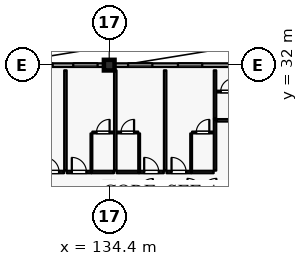
"""IFC4 building model, lengths in metres.
Left out: names, types, materials, properties, quantities, classifications, styles, units other than length and angle.
Written with IfcOpenShell. Run it as: python <this file> out.ifc"""

import sys

from ifc_helpers import new_model, si_unit, direction, frame, frame_2d, origin, origin_2d, place, context, subcontext, project, spatial, rectangle, extrude, element, fill, save


model = new_model("IFC4")
c1 = context("Model", 3, precision=1e-05, world=origin(), true_north=direction((0.0, 1.0)))
c2 = subcontext(c1, "Body", "Model", "MODEL_VIEW")
j1 = project(units=[si_unit("LENGTHUNIT", "METRE"), si_unit("PLANEANGLEUNIT", "RADIAN")], contexts=[c1])
p1 = place(None, origin())
s1 = spatial("IfcSite", under=j1, at=p1, CompositionType="ELEMENT")
p2 = place(p1, origin())
s2 = spatial("IfcBuilding", under=s1, at=p2, CompositionType="ELEMENT")
p3 = place(p2, frame((0.0, 0.0, 36.0)))
s3 = spatial("IfcBuildingStorey", under=s2, at=p3, CompositionType="ELEMENT", Elevation=36.0)
p4 = place(p3, frame((134.4, 32.0, 0.0), z_axis=(0.0, 0.0, 1.0), x_axis=(1.0, 0.0, 0.0)))
e1 = element("IfcColumn", 1, at=p4, inside=s3, PredefinedType="COLUMN", context=c2, shape_type="SweptSolid", body=[
    extrude(rectangle(XDim=0.7, YDim=0.7, at=origin_2d()), origin(), (0.0, 0.0, 1.0), 3.6),
])
p5 = place(p3, frame((134.4, 24.0, 0.0), z_axis=(0.0, 0.0, 1.0), x_axis=(1.0, 0.0, 0.0)))
e2 = element("IfcColumn", 2, at=p5, inside=s3, PredefinedType="COLUMN", context=c2, shape_type="SweptSolid", body=[
    extrude(rectangle(XDim=0.6, YDim=0.6, at=origin_2d()), origin(), (0.0, 0.0, 1.0), 3.6),
])
p6 = place(p3, frame((126.35, 32.0, 0.0), z_axis=(0.0, 0.0, 1.0), x_axis=(1.0, 0.0, 0.0)))
e3 = element("IfcWall", 3, at=p6, inside=s3, PredefinedType="SOLIDWALL", context=c2, shape_type="SweptSolid", body=[
    extrude(rectangle(XDim=7.7, YDim=0.24, at=frame_2d((3.85, 0.0))), origin(), (0.0, 0.0, 1.0), 2.94),
])
p7 = place(p6, frame((0.195, 0.0, 0.8)))
e4 = element("IfcOpeningElement", 4, at=p7, cuts=e3, PredefinedType="OPENING", context=c2, shape_type="SweptSolid", body=[
    extrude(rectangle(XDim=1.4, YDim=1.6, at=frame_2d((0.7, 0.8))), frame((0.0, 0.13, 0.0), z_axis=(0.0, -1.0, 0.0), x_axis=(1.0, 0.0, 0.0)), (0.0, 0.0, 1.0), 0.26),
])
p8 = place(p6, frame((2.73, 0.0, 0.8)))
e5 = element("IfcOpeningElement", 5, at=p8, cuts=e3, PredefinedType="OPENING", context=c2, shape_type="SweptSolid", body=[
    extrude(rectangle(XDim=1.6, YDim=1.6, at=frame_2d((0.8, 0.8))), frame((0.0, 0.13, 0.0), z_axis=(0.0, -1.0, 0.0), x_axis=(1.0, 0.0, 0.0)), (0.0, 0.0, 1.0), 0.26),
])
p9 = place(p6, frame((5.685, 0.0, 0.8)))
e6 = element("IfcOpeningElement", 6, at=p9, cuts=e3, PredefinedType="OPENING", context=c2, shape_type="SweptSolid", body=[
    extrude(rectangle(XDim=1.6, YDim=1.6, at=frame_2d((0.8, 0.8))), frame((0.0, 0.13, 0.0), z_axis=(0.0, -1.0, 0.0), x_axis=(1.0, 0.0, 0.0)), (0.0, 0.0, 1.0), 0.26),
])
p10 = place(p3, frame((134.75, 32.0, 0.0), z_axis=(0.0, 0.0, 1.0), x_axis=(1.0, 0.0, 0.0)))
e7 = element("IfcWall", 7, at=p10, inside=s3, PredefinedType="SOLIDWALL", context=c2, shape_type="SweptSolid", body=[
    extrude(rectangle(XDim=7.7, YDim=0.24, at=frame_2d((3.85, 0.0))), origin(), (0.0, 0.0, 1.0), 2.94),
])
p11 = place(p10, frame((0.89, 0.0, 0.8)))
e8 = element("IfcOpeningElement", 8, at=p11, cuts=e7, PredefinedType="OPENING", context=c2, shape_type="SweptSolid", body=[
    extrude(rectangle(XDim=1.6, YDim=1.6, at=frame_2d((0.8, 0.8))), frame((0.0, 0.13, 0.0), z_axis=(0.0, -1.0, 0.0), x_axis=(1.0, 0.0, 0.0)), (0.0, 0.0, 1.0), 0.26),
])
p12 = place(p10, frame((4.17, 0.0, 0.8)))
e9 = element("IfcOpeningElement", 9, at=p12, cuts=e7, PredefinedType="OPENING", context=c2, shape_type="SweptSolid", body=[
    extrude(rectangle(XDim=1.6, YDim=1.6, at=frame_2d((0.8, 0.8))), frame((0.0, 0.13, 0.0), z_axis=(0.0, -1.0, 0.0), x_axis=(1.0, 0.0, 0.0)), (0.0, 0.0, 1.0), 0.26),
])
p13 = place(p3, frame((129.81, 24.97, 0.0), z_axis=(0.0, 0.0, 1.0), x_axis=(1.0, 0.0, 0.0)))
e10 = element("IfcWall", 10, at=p13, inside=s3, PredefinedType="PARTITIONING", context=c2, shape_type="SweptSolid", body=[
    extrude(rectangle(XDim=1.62, YDim=0.16, at=frame_2d((0.81, 0.0))), origin(), (0.0, 0.0, 1.0), 3.365),
])
p14 = place(p13, frame((0.33, 0.0, 0.0)))
e11 = element("IfcOpeningElement", 11, at=p14, cuts=e10, PredefinedType="OPENING", context=c2, shape_type="SweptSolid", body=[
    extrude(rectangle(XDim=0.96, YDim=2.2, at=frame_2d((0.48, 1.1))), frame((0.0, 0.09, 0.0), z_axis=(0.0, -1.0, 0.0), x_axis=(1.0, 0.0, 0.0)), (0.0, 0.0, 1.0), 0.18),
])
p15 = place(p3, frame((131.61, 24.97, 0.0), z_axis=(0.0, 0.0, 1.0), x_axis=(1.0, 0.0, 0.0)))
e12 = element("IfcWall", 12, at=p15, inside=s3, PredefinedType="PARTITIONING", context=c2, shape_type="SweptSolid", body=[
    extrude(rectangle(XDim=1.62, YDim=0.16, at=frame_2d((0.81, 0.0))), origin(), (0.0, 0.0, 1.0), 3.365),
])
p16 = place(p15, frame((0.33, 0.0, 0.0)))
e13 = element("IfcOpeningElement", 13, at=p16, cuts=e12, PredefinedType="OPENING", context=c2, shape_type="SweptSolid", body=[
    extrude(rectangle(XDim=0.96, YDim=2.2, at=frame_2d((0.48, 1.1))), frame((0.0, 0.09, 0.0), z_axis=(0.0, -1.0, 0.0), x_axis=(1.0, 0.0, 0.0)), (0.0, 0.0, 1.0), 0.18),
])
p17 = place(p3, frame((133.24, 24.97, 0.0), z_axis=(0.0, 0.0, 1.0), x_axis=(1.0, 0.0, 0.0)))
e14 = element("IfcWall", 14, at=p17, inside=s3, PredefinedType="PARTITIONING", context=c2, shape_type="SweptSolid", body=[
    extrude(rectangle(XDim=1.47, YDim=0.16, at=frame_2d((0.735, 0.0))), origin(), (0.0, 0.0, 1.0), 3.365),
])
p18 = place(p3, frame((133.23, 25.06, 0.0), z_axis=(0.0, 0.0, 1.0), x_axis=(0.0, 1.0, 0.0)))
e15 = element("IfcWall", 15, at=p18, inside=s3, PredefinedType="PARTITIONING", context=c2, shape_type="SweptSolid", body=[
    extrude(rectangle(XDim=2.45, YDim=0.115, at=frame_2d((1.225, 0.0))), origin(), (0.0, 0.0, 1.0), 3.365),
])
p19 = place(p3, frame((133.29, 27.57, 0.0), z_axis=(0.0, 0.0, 1.0), x_axis=(1.0, 0.0, 0.0)))
e16 = element("IfcWall", 16, at=p19, inside=s3, PredefinedType="PARTITIONING", context=c2, shape_type="SweptSolid", body=[
    extrude(rectangle(XDim=1.41, YDim=0.115, at=frame_2d((0.705, 0.0))), origin(), (0.0, 0.0, 1.0), 3.365),
])
p20 = place(p19, frame((0.275, 0.0, 0.0)))
e17 = element("IfcOpeningElement", 17, at=p20, cuts=e16, PredefinedType="OPENING", context=c2, shape_type="SweptSolid", body=[
    extrude(rectangle(XDim=0.86, YDim=2.12, at=frame_2d((0.43, 1.06))), frame((0.0, 0.067, 0.0), z_axis=(0.0, -1.0, 0.0), x_axis=(1.0, 0.0, 0.0)), (0.0, 0.0, 1.0), 0.135),
])
p21 = place(p3, frame((131.52, 25.06, 0.0), z_axis=(0.0, 0.0, 1.0), x_axis=(0.0, 1.0, 0.0)))
e18 = element("IfcWall", 18, at=p21, inside=s3, PredefinedType="PARTITIONING", context=c2, shape_type="SweptSolid", body=[
    extrude(rectangle(XDim=6.6, YDim=0.16, at=frame_2d((3.3, 0.0))), origin(), (0.0, 0.0, 1.0), 3.365),
])
p22 = place(p3, frame((134.89, 24.97, 0.0), z_axis=(0.0, 0.0, 1.0), x_axis=(1.0, 0.0, 0.0)))
e19 = element("IfcWall", 19, at=p22, inside=s3, PredefinedType="PARTITIONING", context=c2, shape_type="SweptSolid", body=[
    extrude(rectangle(XDim=1.47, YDim=0.16, at=frame_2d((0.735, 0.0))), origin(), (0.0, 0.0, 1.0), 3.365),
])
p23 = place(p3, frame((136.37, 24.97, 0.0), z_axis=(0.0, 0.0, 1.0), x_axis=(1.0, 0.0, 0.0)))
e20 = element("IfcWall", 20, at=p23, inside=s3, PredefinedType="PARTITIONING", context=c2, shape_type="SweptSolid", body=[
    extrude(rectangle(XDim=1.62, YDim=0.16, at=frame_2d((0.81, 0.0))), origin(), (0.0, 0.0, 1.0), 3.365),
])
p24 = place(p23, frame((0.33, 0.0, 0.0)))
e21 = element("IfcOpeningElement", 21, at=p24, cuts=e20, PredefinedType="OPENING", context=c2, shape_type="SweptSolid", body=[
    extrude(rectangle(XDim=0.96, YDim=2.2, at=frame_2d((0.48, 1.1))), frame((0.0, 0.09, 0.0), z_axis=(0.0, -1.0, 0.0), x_axis=(1.0, 0.0, 0.0)), (0.0, 0.0, 1.0), 0.18),
])
p25 = place(p3, frame((136.37, 25.06, 0.0), z_axis=(0.0, 0.0, 1.0), x_axis=(0.0, 1.0, 0.0)))
e22 = element("IfcWall", 22, at=p25, inside=s3, PredefinedType="PARTITIONING", context=c2, shape_type="SweptSolid", body=[
    extrude(rectangle(XDim=2.45, YDim=0.115, at=frame_2d((1.225, 0.0))), origin(), (0.0, 0.0, 1.0), 3.365),
])
p26 = place(p3, frame((134.9, 27.57, 0.0), z_axis=(0.0, 0.0, 1.0), x_axis=(1.0, 0.0, 0.0)))
e23 = element("IfcWall", 23, at=p26, inside=s3, PredefinedType="PARTITIONING", context=c2, shape_type="SweptSolid", body=[
    extrude(rectangle(XDim=1.41, YDim=0.115, at=frame_2d((0.705, 0.0))), origin(), (0.0, 0.0, 1.0), 3.365),
])
p27 = place(p26, frame((0.275, 0.0, 0.0)))
e24 = element("IfcOpeningElement", 24, at=p27, cuts=e23, PredefinedType="OPENING", context=c2, shape_type="SweptSolid", body=[
    extrude(rectangle(XDim=0.86, YDim=2.12, at=frame_2d((0.43, 1.06))), frame((0.0, 0.067, 0.0), z_axis=(0.0, -1.0, 0.0), x_axis=(1.0, 0.0, 0.0)), (0.0, 0.0, 1.0), 0.135),
])
p28 = place(p3, frame((134.8, 25.06, 0.0), z_axis=(0.0, 0.0, 1.0), x_axis=(0.0, 1.0, 0.0)))
e25 = element("IfcWall", 25, at=p28, inside=s3, PredefinedType="PARTITIONING", context=c2, shape_type="SweptSolid", body=[
    extrude(rectangle(XDim=6.6, YDim=0.16, at=frame_2d((3.3, 0.0))), origin(), (0.0, 0.0, 1.0), 3.365),
])
p29 = place(p3, frame((138.17, 24.97, 0.0), z_axis=(0.0, 0.0, 1.0), x_axis=(1.0, 0.0, 0.0)))
e26 = element("IfcWall", 26, at=p29, inside=s3, PredefinedType="PARTITIONING", context=c2, shape_type="SweptSolid", body=[
    extrude(rectangle(XDim=1.62, YDim=0.16, at=frame_2d((0.81, 0.0))), origin(), (0.0, 0.0, 1.0), 3.365),
])
p30 = place(p29, frame((0.33, 0.0, 0.0)))
e27 = element("IfcOpeningElement", 27, at=p30, cuts=e26, PredefinedType="OPENING", context=c2, shape_type="SweptSolid", body=[
    extrude(rectangle(XDim=0.96, YDim=2.2, at=frame_2d((0.48, 1.1))), frame((0.0, 0.09, 0.0), z_axis=(0.0, -1.0, 0.0), x_axis=(1.0, 0.0, 0.0)), (0.0, 0.0, 1.0), 0.18),
])
p31 = place(p3, frame((139.8, 24.97, 0.0), z_axis=(0.0, 0.0, 1.0), x_axis=(1.0, 0.0, 0.0)))
e28 = element("IfcWall", 28, at=p31, inside=s3, PredefinedType="PARTITIONING", context=c2, shape_type="SweptSolid", body=[
    extrude(rectangle(XDim=1.47, YDim=0.16, at=frame_2d((0.735, 0.0))), origin(), (0.0, 0.0, 1.0), 3.365),
])
p32 = place(p3, frame((139.79, 25.06, 0.0), z_axis=(0.0, 0.0, 1.0), x_axis=(0.0, 1.0, 0.0)))
e29 = element("IfcWall", 29, at=p32, inside=s3, PredefinedType="PARTITIONING", context=c2, shape_type="SweptSolid", body=[
    extrude(rectangle(XDim=2.45, YDim=0.115, at=frame_2d((1.225, 0.0))), origin(), (0.0, 0.0, 1.0), 3.365),
])
p33 = place(p3, frame((139.85, 27.57, 0.0), z_axis=(0.0, 0.0, 1.0), x_axis=(1.0, 0.0, 0.0)))
e30 = element("IfcWall", 30, at=p33, inside=s3, PredefinedType="PARTITIONING", context=c2, shape_type="SweptSolid", body=[
    extrude(rectangle(XDim=1.41, YDim=0.115, at=frame_2d((0.705, 0.0))), origin(), (0.0, 0.0, 1.0), 3.365),
])
p34 = place(p33, frame((0.275, 0.0, 0.0)))
e31 = element("IfcOpeningElement", 31, at=p34, cuts=e30, PredefinedType="OPENING", context=c2, shape_type="SweptSolid", body=[
    extrude(rectangle(XDim=0.86, YDim=2.12, at=frame_2d((0.43, 1.06))), frame((0.0, 0.067, 0.0), z_axis=(0.0, -1.0, 0.0), x_axis=(1.0, 0.0, 0.0)), (0.0, 0.0, 1.0), 0.135),
])
p35 = place(p3, frame((138.08, 25.06, 0.0), z_axis=(0.0, 0.0, 1.0), x_axis=(0.0, 1.0, 0.0)))
e32 = element("IfcWall", 32, at=p35, inside=s3, PredefinedType="PARTITIONING", context=c2, shape_type="SweptSolid", body=[
    extrude(rectangle(XDim=6.6, YDim=0.16, at=frame_2d((3.3, 0.0))), origin(), (0.0, 0.0, 1.0), 3.365),
])
p36 = place(p3, frame((141.36, 25.06, 0.0), z_axis=(0.0, 0.0, 1.0), x_axis=(0.0, 1.0, 0.0)))
e33 = element("IfcWall", 33, at=p36, inside=s3, PredefinedType="PARTITIONING", context=c2, shape_type="SweptSolid", body=[
    extrude(rectangle(XDim=3.39, YDim=0.16, at=frame_2d((1.695, 0.0))), origin(), (0.0, 0.0, 1.0), 3.365),
])
p37 = place(p3, frame((141.45, 28.37, 0.0), z_axis=(0.0, 0.0, 1.0), x_axis=(1.0, 0.0, 0.0)))
e34 = element("IfcWall", 34, at=p37, inside=s3, PredefinedType="PARTITIONING", context=c2, shape_type="SweptSolid", body=[
    extrude(rectangle(XDim=1.47, YDim=0.16, at=frame_2d((0.735, 0.0))), origin(), (0.0, 0.0, 1.0), 3.365),
])
p38 = place(p3, frame((141.46, 30.26, 0.0), z_axis=(0.0, 0.0, 1.0), x_axis=(1.0, 0.0, 0.0)))
e35 = element("IfcWall", 35, at=p38, inside=s3, PredefinedType="PARTITIONING", context=c2, shape_type="SweptSolid", body=[
    extrude(rectangle(XDim=1.41, YDim=0.115, at=frame_2d((0.705, 0.0))), origin(), (0.0, 0.0, 1.0), 3.365),
])
p39 = place(p38, frame((0.275, 0.0, 0.0)))
e36 = element("IfcOpeningElement", 36, at=p39, cuts=e35, PredefinedType="OPENING", context=c2, shape_type="SweptSolid", body=[
    extrude(rectangle(XDim=0.86, YDim=2.12, at=frame_2d((0.43, 1.06))), frame((0.0, 0.067, 0.0), z_axis=(0.0, -1.0, 0.0), x_axis=(1.0, 0.0, 0.0)), (0.0, 0.0, 1.0), 0.135),
])
p40 = place(p3, frame((141.36, 28.46, 0.0), z_axis=(0.0, 0.0, 1.0), x_axis=(0.0, 1.0, 0.0)))
e37 = element("IfcWall", 37, at=p40, inside=s3, PredefinedType="PARTITIONING", context=c2, shape_type="SweptSolid", body=[
    extrude(rectangle(XDim=3.2, YDim=0.16, at=frame_2d((1.6, 0.0))), origin(), (0.0, 0.0, 1.0), 3.365),
])
p41 = place(p8, origin())
e38 = element("IfcWindow", 38, at=p41, inside=s3, PartitioningType="SINGLE_PANEL", PredefinedType="WINDOW", context=c2, shape_type="SweptSolid", body=[
    extrude(rectangle(XDim=1.6, YDim=1.6, at=frame_2d((0.8, 0.8))), frame((0.0, 0.03, 0.0), z_axis=(0.0, -1.0, 0.0), x_axis=(1.0, 0.0, 0.0)), (0.0, 0.0, 1.0), 0.06),
])
fill(e5, e38)
p42 = place(p9, origin())
e39 = element("IfcWindow", 39, at=p42, inside=s3, PartitioningType="SINGLE_PANEL", PredefinedType="WINDOW", context=c2, shape_type="SweptSolid", body=[
    extrude(rectangle(XDim=1.6, YDim=1.6, at=frame_2d((0.8, 0.8))), frame((0.0, 0.03, 0.0), z_axis=(0.0, -1.0, 0.0), x_axis=(1.0, 0.0, 0.0)), (0.0, 0.0, 1.0), 0.06),
])
fill(e6, e39)
p43 = place(p11, origin())
e40 = element("IfcWindow", 40, at=p43, inside=s3, PartitioningType="SINGLE_PANEL", PredefinedType="WINDOW", context=c2, shape_type="SweptSolid", body=[
    extrude(rectangle(XDim=1.6, YDim=1.6, at=frame_2d((0.8, 0.8))), frame((0.0, 0.03, 0.0), z_axis=(0.0, -1.0, 0.0), x_axis=(1.0, 0.0, 0.0)), (0.0, 0.0, 1.0), 0.06),
])
fill(e8, e40)
p44 = place(p12, origin())
e41 = element("IfcWindow", 41, at=p44, inside=s3, PartitioningType="SINGLE_PANEL", PredefinedType="WINDOW", context=c2, shape_type="SweptSolid", body=[
    extrude(rectangle(XDim=1.6, YDim=1.6, at=frame_2d((0.8, 0.8))), frame((0.0, 0.03, 0.0), z_axis=(0.0, -1.0, 0.0), x_axis=(1.0, 0.0, 0.0)), (0.0, 0.0, 1.0), 0.06),
])
fill(e9, e41)
p45 = place(p14, origin())
e42 = element("IfcDoor", 42, at=p45, inside=s3, OperationType="SINGLE_SWING_LEFT", PredefinedType="DOOR", context=c2, shape_type="SweptSolid", body=[
    extrude(rectangle(XDim=0.96, YDim=2.2, at=frame_2d((0.48, 1.1))), frame((0.0, 0.025, 0.0), z_axis=(0.0, -1.0, 0.0), x_axis=(1.0, 0.0, 0.0)), (0.0, 0.0, 1.0), 0.05),
])
fill(e11, e42)
p46 = place(p16, origin())
e43 = element("IfcDoor", 43, at=p46, inside=s3, OperationType="SINGLE_SWING_LEFT", PredefinedType="DOOR", context=c2, shape_type="SweptSolid", body=[
    extrude(rectangle(XDim=0.96, YDim=2.2, at=frame_2d((0.48, 1.1))), frame((0.0, 0.025, 0.0), z_axis=(0.0, -1.0, 0.0), x_axis=(1.0, 0.0, 0.0)), (0.0, 0.0, 1.0), 0.05),
])
fill(e13, e43)
p47 = place(p20, origin())
e44 = element("IfcDoor", 44, at=p47, inside=s3, OperationType="SINGLE_SWING_RIGHT", PredefinedType="DOOR", context=c2, shape_type="SweptSolid", body=[
    extrude(rectangle(XDim=0.86, YDim=2.12, at=frame_2d((0.43, 1.06))), frame((0.0, 0.025, 0.0), z_axis=(0.0, -1.0, 0.0), x_axis=(1.0, 0.0, 0.0)), (0.0, 0.0, 1.0), 0.05),
])
fill(e17, e44)
p48 = place(p24, origin())
e45 = element("IfcDoor", 45, at=p48, inside=s3, OperationType="SINGLE_SWING_LEFT", PredefinedType="DOOR", context=c2, shape_type="SweptSolid", body=[
    extrude(rectangle(XDim=0.96, YDim=2.2, at=frame_2d((0.48, 1.1))), frame((0.0, 0.025, 0.0), z_axis=(0.0, -1.0, 0.0), x_axis=(1.0, 0.0, 0.0)), (0.0, 0.0, 1.0), 0.05),
])
fill(e21, e45)
p49 = place(p27, origin())
e46 = element("IfcDoor", 46, at=p49, inside=s3, OperationType="SINGLE_SWING_RIGHT", PredefinedType="DOOR", context=c2, shape_type="SweptSolid", body=[
    extrude(rectangle(XDim=0.86, YDim=2.12, at=frame_2d((0.43, 1.06))), frame((0.0, 0.025, 0.0), z_axis=(0.0, -1.0, 0.0), x_axis=(1.0, 0.0, 0.0)), (0.0, 0.0, 1.0), 0.05),
])
fill(e24, e46)
p50 = place(p30, origin())
e47 = element("IfcDoor", 47, at=p50, inside=s3, OperationType="SINGLE_SWING_LEFT", PredefinedType="DOOR", context=c2, shape_type="SweptSolid", body=[
    extrude(rectangle(XDim=0.96, YDim=2.2, at=frame_2d((0.48, 1.1))), frame((0.0, 0.025, 0.0), z_axis=(0.0, -1.0, 0.0), x_axis=(1.0, 0.0, 0.0)), (0.0, 0.0, 1.0), 0.05),
])
fill(e27, e47)
p51 = place(p34, origin())
e48 = element("IfcDoor", 48, at=p51, inside=s3, OperationType="SINGLE_SWING_RIGHT", PredefinedType="DOOR", context=c2, shape_type="SweptSolid", body=[
    extrude(rectangle(XDim=0.86, YDim=2.12, at=frame_2d((0.43, 1.06))), frame((0.0, 0.025, 0.0), z_axis=(0.0, -1.0, 0.0), x_axis=(1.0, 0.0, 0.0)), (0.0, 0.0, 1.0), 0.05),
])
fill(e31, e48)
p52 = place(p39, origin())
e49 = element("IfcDoor", 49, at=p52, inside=s3, OperationType="SINGLE_SWING_RIGHT", PredefinedType="DOOR", context=c2, shape_type="SweptSolid", body=[
    extrude(rectangle(XDim=0.86, YDim=2.12, at=frame_2d((0.43, 1.06))), frame((0.0, 0.025, 0.0), z_axis=(0.0, -1.0, 0.0), x_axis=(1.0, 0.0, 0.0)), (0.0, 0.0, 1.0), 0.05),
])
fill(e36, e49)
save(model, sys.argv[1])
